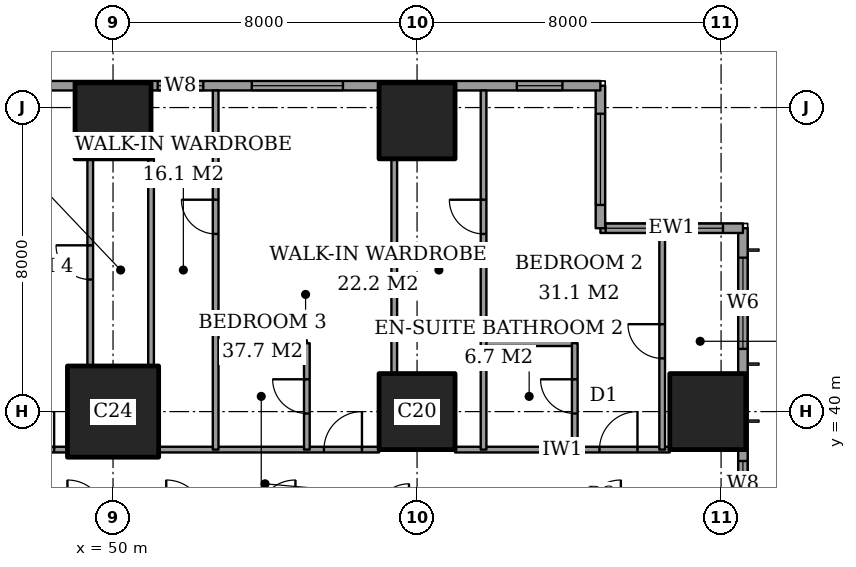
"""IFC4 building model, lengths in metres.
Left out: names, types, materials, properties, quantities, classifications, styles, units other than length and angle.
Written with IfcOpenShell. Run it as: python <this file> out.ifc"""

import sys

from ifc_helpers import new_model, si_unit, direction, frame, frame_2d, origin, origin_2d, place, context, subcontext, project, spatial, rectangle, extrude, element, fill, save


model = new_model("IFC4")
c1 = context("Model", 3, precision=1e-05, world=origin(), true_north=direction((0.0, 1.0)))
c2 = subcontext(c1, "Body", "Model", "MODEL_VIEW")
j1 = project(units=[si_unit("LENGTHUNIT", "METRE"), si_unit("PLANEANGLEUNIT", "RADIAN")], contexts=[c1])
p1 = place(None, origin())
s1 = spatial("IfcSite", under=j1, at=p1, CompositionType="ELEMENT")
p2 = place(p1, origin())
s2 = spatial("IfcBuilding", under=s1, at=p2, CompositionType="ELEMENT")
p3 = place(p2, frame((0.0, 0.0, 65.6)))
s3 = spatial("IfcBuildingStorey", under=s2, at=p3, CompositionType="ELEMENT", Elevation=65.6)
p4 = place(p3, frame((50.0, 40.0, 0.0), z_axis=(0.0, 0.0, 1.0), x_axis=(1.0, 0.0, 0.0)))
e1 = element("IfcColumn", 1, at=p4, inside=s3, PredefinedType="COLUMN", context=c2, shape_type="SweptSolid", body=[
    extrude(rectangle(XDim=2.4, YDim=2.4, at=origin_2d()), origin(), (0.0, 0.0, 1.0), 3.6),
])
for number, where, z_axis, x_axis in (
    (2, (50.0, 47.65, 0.0), (0.0, 0.0, 1.0), (1.0, 0.0, 0.0)),
    (3, (58.0, 40.0, 0.0), (0.0, 0.0, 1.0), (1.0, 0.0, 0.0)),
    (4, (58.0, 47.65, 0.0), (0.0, 0.0, 1.0), (1.0, 0.0, 0.0)),
    (5, (65.65, 40.0, 0.0), (0.0, 0.0, 1.0), (1.0, 0.0, 0.0)),
):
    element("IfcColumn", number, at=place(p3, frame(where, z_axis=z_axis, x_axis=x_axis)), inside=s3, PredefinedType="COLUMN", context=c2, shape_type="SweptSolid", body=[
        extrude(rectangle(XDim=2.0, YDim=2.0, at=origin_2d()), origin(), (0.0, 0.0, 1.0), 3.6),
    ])
p5 = place(p3, frame((66.575, 3.175, 0.0), z_axis=(0.0, 0.0, 1.0), x_axis=(0.0, 1.0, 0.0)))
e6 = element("IfcWall", 6, at=p5, inside=s3, PredefinedType="SOLIDWALL", context=c2, shape_type="SweptSolid", body=[
    extrude(rectangle(XDim=41.65, YDim=0.25, at=frame_2d((20.825, 0.0))), origin(), (0.0, 0.0, 1.0), 3.6),
])
p6 = place(p5, frame((0.775, 0.0, 0.6)))
e7 = element("IfcOpeningElement", 7, at=p6, cuts=e6, PredefinedType="OPENING", context=c2, shape_type="SweptSolid", body=[
    extrude(rectangle(XDim=2.4, YDim=2.0, at=frame_2d((1.2, 1.0))), frame((0.0, 0.135, 0.0), z_axis=(0.0, -1.0, 0.0), x_axis=(1.0, 0.0, 0.0)), (0.0, 0.0, 1.0), 0.27),
])
p7 = place(p5, frame((6.1, 0.0, 0.6)))
e8 = element("IfcOpeningElement", 8, at=p7, cuts=e6, PredefinedType="OPENING", context=c2, shape_type="SweptSolid", body=[
    extrude(rectangle(XDim=1.2, YDim=2.0, at=frame_2d((0.6, 1.0))), frame((0.0, 0.135, 0.0), z_axis=(0.0, -1.0, 0.0), x_axis=(1.0, 0.0, 0.0)), (0.0, 0.0, 1.0), 0.27),
])
p8 = place(p5, frame((8.275, 0.0, 0.6)))
e9 = element("IfcOpeningElement", 9, at=p8, cuts=e6, PredefinedType="OPENING", context=c2, shape_type="SweptSolid", body=[
    extrude(rectangle(XDim=2.4, YDim=2.0, at=frame_2d((1.2, 1.0))), frame((0.0, 0.135, 0.0), z_axis=(0.0, -1.0, 0.0), x_axis=(1.0, 0.0, 0.0)), (0.0, 0.0, 1.0), 0.27),
])
p9 = place(p5, frame((15.775, 0.0, 0.6)))
e10 = element("IfcOpeningElement", 10, at=p9, cuts=e6, PredefinedType="OPENING", context=c2, shape_type="SweptSolid", body=[
    extrude(rectangle(XDim=2.4, YDim=2.0, at=frame_2d((1.2, 1.0))), frame((0.0, 0.135, 0.0), z_axis=(0.0, -1.0, 0.0), x_axis=(1.0, 0.0, 0.0)), (0.0, 0.0, 1.0), 0.27),
])
p10 = place(p5, frame((23.475, 0.0, 0.6)))
e11 = element("IfcOpeningElement", 11, at=p10, cuts=e6, PredefinedType="OPENING", context=c2, shape_type="SweptSolid", body=[
    extrude(rectangle(XDim=2.4, YDim=2.0, at=frame_2d((1.2, 1.0))), frame((0.0, 0.135, 0.0), z_axis=(0.0, -1.0, 0.0), x_axis=(1.0, 0.0, 0.0)), (0.0, 0.0, 1.0), 0.27),
])
p11 = place(p5, frame((30.875, 0.0, 0.6)))
e12 = element("IfcOpeningElement", 12, at=p11, cuts=e6, PredefinedType="OPENING", context=c2, shape_type="SweptSolid", body=[
    extrude(rectangle(XDim=2.4, YDim=2.0, at=frame_2d((1.2, 1.0))), frame((0.0, 0.135, 0.0), z_axis=(0.0, -1.0, 0.0), x_axis=(1.0, 0.0, 0.0)), (0.0, 0.0, 1.0), 0.27),
])
p12 = place(p5, frame((34.325, 0.0, 0.6)))
e13 = element("IfcOpeningElement", 13, at=p12, cuts=e6, PredefinedType="OPENING", context=c2, shape_type="SweptSolid", body=[
    extrude(rectangle(XDim=1.2, YDim=2.0, at=frame_2d((0.6, 1.0))), frame((0.0, 0.135, 0.0), z_axis=(0.0, -1.0, 0.0), x_axis=(1.0, 0.0, 0.0)), (0.0, 0.0, 1.0), 0.27),
])
p13 = place(p5, frame((38.475, 0.0, 0.6)))
e14 = element("IfcOpeningElement", 14, at=p13, cuts=e6, PredefinedType="OPENING", context=c2, shape_type="SweptSolid", body=[
    extrude(rectangle(XDim=2.4, YDim=2.0, at=frame_2d((1.2, 1.0))), frame((0.0, 0.135, 0.0), z_axis=(0.0, -1.0, 0.0), x_axis=(1.0, 0.0, 0.0)), (0.0, 0.0, 1.0), 0.27),
])
p14 = place(p3, frame((66.575, 44.825, 0.0), z_axis=(0.0, 0.0, 1.0), x_axis=(-1.0, 0.0, 0.0)))
e15 = element("IfcWall", 15, at=p14, inside=s3, PredefinedType="SOLIDWALL", context=c2, shape_type="SweptSolid", body=[
    extrude(rectangle(XDim=3.75, YDim=0.25, at=frame_2d((1.875, 0.0))), origin(), (0.0, 0.0, 1.0), 3.6),
])
p15 = place(p14, frame((0.525, 0.0, 0.6)))
e16 = element("IfcOpeningElement", 16, at=p15, cuts=e15, PredefinedType="OPENING", context=c2, shape_type="SweptSolid", body=[
    extrude(rectangle(XDim=1.2, YDim=2.0, at=frame_2d((0.6, 1.0))), frame((0.0, 0.135, 0.0), z_axis=(0.0, -1.0, 0.0), x_axis=(1.0, 0.0, 0.0)), (0.0, 0.0, 1.0), 0.27),
])
p16 = place(p14, frame((2.413, 0.0, 0.6)))
e17 = element("IfcOpeningElement", 17, at=p16, cuts=e15, PredefinedType="OPENING", context=c2, shape_type="SweptSolid", body=[
    extrude(rectangle(XDim=1.2, YDim=2.0, at=frame_2d((0.6, 1.0))), frame((0.0, 0.135, 0.0), z_axis=(0.0, -1.0, 0.0), x_axis=(1.0, 0.0, 0.0)), (0.0, 0.0, 1.0), 0.27),
])
p17 = place(p3, frame((62.825, 44.825, 0.0), z_axis=(0.0, 0.0, 1.0), x_axis=(0.0, 1.0, 0.0)))
e18 = element("IfcWall", 18, at=p17, inside=s3, PredefinedType="SOLIDWALL", context=c2, shape_type="SweptSolid", body=[
    extrude(rectangle(XDim=3.75, YDim=0.25, at=frame_2d((1.875, 0.0))), origin(), (0.0, 0.0, 1.0), 3.6),
])
p18 = place(p17, frame((0.613, 0.0, 0.6)))
e19 = element("IfcOpeningElement", 19, at=p18, cuts=e18, PredefinedType="OPENING", context=c2, shape_type="SweptSolid", body=[
    extrude(rectangle(XDim=2.4, YDim=2.0, at=frame_2d((1.2, 1.0))), frame((0.0, 0.135, 0.0), z_axis=(0.0, -1.0, 0.0), x_axis=(1.0, 0.0, 0.0)), (0.0, 0.0, 1.0), 0.27),
])
p19 = place(p3, frame((62.825, 48.575, 0.0), z_axis=(0.0, 0.0, 1.0), x_axis=(-1.0, 0.0, 0.0)))
e20 = element("IfcWall", 20, at=p19, inside=s3, PredefinedType="SOLIDWALL", context=c2, shape_type="SweptSolid", body=[
    extrude(rectangle(XDim=21.4, YDim=0.25, at=frame_2d((10.7, 0.0))), origin(), (0.0, 0.0, 1.0), 3.6),
])
p20 = place(p19, frame((1.0, 0.0, 0.6)))
e21 = element("IfcOpeningElement", 21, at=p20, cuts=e20, PredefinedType="OPENING", context=c2, shape_type="SweptSolid", body=[
    extrude(rectangle(XDim=1.2, YDim=2.0, at=frame_2d((0.6, 1.0))), frame((0.0, 0.135, 0.0), z_axis=(0.0, -1.0, 0.0), x_axis=(1.0, 0.0, 0.0)), (0.0, 0.0, 1.0), 0.27),
])
p21 = place(p19, frame((6.775, 0.0, 0.6)))
e22 = element("IfcOpeningElement", 22, at=p21, cuts=e20, PredefinedType="OPENING", context=c2, shape_type="SweptSolid", body=[
    extrude(rectangle(XDim=2.4, YDim=2.0, at=frame_2d((1.2, 1.0))), frame((0.0, 0.135, 0.0), z_axis=(0.0, -1.0, 0.0), x_axis=(1.0, 0.0, 0.0)), (0.0, 0.0, 1.0), 0.27),
])
p22 = place(p19, frame((10.45, 0.0, 0.6)))
e23 = element("IfcOpeningElement", 23, at=p22, cuts=e20, PredefinedType="OPENING", context=c2, shape_type="SweptSolid", body=[
    extrude(rectangle(XDim=1.2, YDim=2.0, at=frame_2d((0.6, 1.0))), frame((0.0, 0.135, 0.0), z_axis=(0.0, -1.0, 0.0), x_axis=(1.0, 0.0, 0.0)), (0.0, 0.0, 1.0), 0.27),
])
p23 = place(p19, frame((14.475, 0.0, 0.6)))
e24 = element("IfcOpeningElement", 24, at=p23, cuts=e20, PredefinedType="OPENING", context=c2, shape_type="SweptSolid", body=[
    extrude(rectangle(XDim=2.4, YDim=2.0, at=frame_2d((1.2, 1.0))), frame((0.0, 0.135, 0.0), z_axis=(0.0, -1.0, 0.0), x_axis=(1.0, 0.0, 0.0)), (0.0, 0.0, 1.0), 0.27),
])
p24 = place(p19, frame((17.9, 0.0, 0.6)))
e25 = element("IfcOpeningElement", 25, at=p24, cuts=e20, PredefinedType="OPENING", context=c2, shape_type="SweptSolid", body=[
    extrude(rectangle(XDim=1.2, YDim=2.0, at=frame_2d((0.6, 1.0))), frame((0.0, 0.135, 0.0), z_axis=(0.0, -1.0, 0.0), x_axis=(1.0, 0.0, 0.0)), (0.0, 0.0, 1.0), 0.27),
])
p25 = place(p3, frame((43.35, 39.0, 0.0), z_axis=(0.0, 0.0, 1.0), x_axis=(1.0, 0.0, 0.0)))
e26 = element("IfcWall", 26, at=p25, inside=s3, PredefinedType="PARTITIONING", context=c2, shape_type="SweptSolid", body=[
    extrude(rectangle(XDim=5.45, YDim=0.15, at=frame_2d((2.725, 0.0))), origin(), (0.0, 0.0, 1.0), 3.35),
])
p26 = place(p25, frame((4.1, 0.0, 0.0)))
e27 = element("IfcOpeningElement", 27, at=p26, cuts=e26, PredefinedType="OPENING", context=c2, shape_type="SweptSolid", body=[
    extrude(rectangle(XDim=1.0, YDim=2.1, at=frame_2d((0.5, 1.05))), frame((0.0, 0.085, 0.0), z_axis=(0.0, -1.0, 0.0), x_axis=(1.0, 0.0, 0.0)), (0.0, 0.0, 1.0), 0.17),
])
p27 = place(p25, frame((0.475, 0.0, 0.0)))
e28 = element("IfcOpeningElement", 28, at=p27, cuts=e26, PredefinedType="OPENING", context=c2, shape_type="SweptSolid", body=[
    extrude(rectangle(XDim=1.0, YDim=2.1, at=frame_2d((0.5, 1.05))), frame((0.0, 0.085, 0.0), z_axis=(0.0, -1.0, 0.0), x_axis=(1.0, 0.0, 0.0)), (0.0, 0.0, 1.0), 0.17),
])
p28 = place(p3, frame((51.2, 39.0, 0.0), z_axis=(0.0, 0.0, 1.0), x_axis=(1.0, 0.0, 0.0)))
e29 = element("IfcWall", 29, at=p28, inside=s3, PredefinedType="PARTITIONING", context=c2, shape_type="SweptSolid", body=[
    extrude(rectangle(XDim=5.8, YDim=0.15, at=frame_2d((2.9, 0.0))), origin(), (0.0, 0.0, 1.0), 3.35),
])
p29 = place(p28, frame((4.35, 0.0, 0.0)))
e30 = element("IfcOpeningElement", 30, at=p29, cuts=e29, PredefinedType="OPENING", context=c2, shape_type="SweptSolid", body=[
    extrude(rectangle(XDim=1.0, YDim=2.1, at=frame_2d((0.5, 1.05))), frame((0.0, 0.085, 0.0), z_axis=(0.0, -1.0, 0.0), x_axis=(1.0, 0.0, 0.0)), (0.0, 0.0, 1.0), 0.17),
])
p30 = place(p3, frame((59.0, 39.0, 0.0), z_axis=(0.0, 0.0, 1.0), x_axis=(1.0, 0.0, 0.0)))
e31 = element("IfcWall", 31, at=p30, inside=s3, PredefinedType="PARTITIONING", context=c2, shape_type="SweptSolid", body=[
    extrude(rectangle(XDim=5.65, YDim=0.15, at=frame_2d((2.825, 0.0))), origin(), (0.0, 0.0, 1.0), 3.35),
])
p31 = place(p30, frame((3.8, 0.0, 0.0)))
e32 = element("IfcOpeningElement", 32, at=p31, cuts=e31, PredefinedType="OPENING", context=c2, shape_type="SweptSolid", body=[
    extrude(rectangle(XDim=1.0, YDim=2.1, at=frame_2d((0.5, 1.05))), frame((0.0, 0.085, 0.0), z_axis=(0.0, -1.0, 0.0), x_axis=(1.0, 0.0, 0.0)), (0.0, 0.0, 1.0), 0.17),
])
p32 = place(p3, frame((52.7, 41.8, 0.0), z_axis=(0.0, 0.0, 1.0), x_axis=(1.0, 0.0, 0.0)))
e33 = element("IfcWall", 33, at=p32, inside=s3, PredefinedType="PARTITIONING", context=c2, shape_type="SweptSolid", body=[
    extrude(rectangle(XDim=2.4, YDim=0.15, at=frame_2d((1.2, 0.0))), origin(), (0.0, 0.0, 1.0), 3.35),
])
p33 = place(p3, frame((59.75, 41.8, 0.0), z_axis=(0.0, 0.0, 1.0), x_axis=(1.0, 0.0, 0.0)))
e34 = element("IfcWall", 34, at=p33, inside=s3, PredefinedType="PARTITIONING", context=c2, shape_type="SweptSolid", body=[
    extrude(rectangle(XDim=2.4, YDim=0.15, at=frame_2d((1.2, 0.0))), origin(), (0.0, 0.0, 1.0), 3.35),
])
p34 = place(p3, frame((49.4, 41.2, 0.0), z_axis=(0.0, 0.0, 1.0), x_axis=(0.0, 1.0, 0.0)))
e35 = element("IfcWall", 35, at=p34, inside=s3, PredefinedType="PARTITIONING", context=c2, shape_type="SweptSolid", body=[
    extrude(rectangle(XDim=5.45, YDim=0.15, at=frame_2d((2.725, 0.0))), origin(), (0.0, 0.0, 1.0), 3.35),
])
p35 = place(p34, frame((2.275, 0.0, 0.0)))
e36 = element("IfcOpeningElement", 36, at=p35, cuts=e35, PredefinedType="OPENING", context=c2, shape_type="SweptSolid", body=[
    extrude(rectangle(XDim=0.9, YDim=2.1, at=frame_2d((0.45, 1.05))), frame((0.0, 0.085, 0.0), z_axis=(0.0, -1.0, 0.0), x_axis=(1.0, 0.0, 0.0)), (0.0, 0.0, 1.0), 0.17),
])
p36 = place(p3, frame((51.0, 41.2, 0.0), z_axis=(0.0, 0.0, 1.0), x_axis=(0.0, 1.0, 0.0)))
e37 = element("IfcWall", 37, at=p36, inside=s3, PredefinedType="PARTITIONING", context=c2, shape_type="SweptSolid", body=[
    extrude(rectangle(XDim=5.45, YDim=0.15, at=frame_2d((2.725, 0.0))), origin(), (0.0, 0.0, 1.0), 3.35),
])
p37 = place(p3, frame((52.7, 39.0, 0.0), z_axis=(0.0, 0.0, 1.0), x_axis=(0.0, 1.0, 0.0)))
e38 = element("IfcWall", 38, at=p37, inside=s3, PredefinedType="PARTITIONING", context=c2, shape_type="SweptSolid", body=[
    extrude(rectangle(XDim=9.45, YDim=0.15, at=frame_2d((4.725, 0.0))), origin(), (0.0, 0.0, 1.0), 3.35),
])
p38 = place(p37, frame((5.675, 0.0, 0.0)))
e39 = element("IfcOpeningElement", 39, at=p38, cuts=e38, PredefinedType="OPENING", context=c2, shape_type="SweptSolid", body=[
    extrude(rectangle(XDim=0.9, YDim=2.1, at=frame_2d((0.45, 1.05))), frame((0.0, 0.085, 0.0), z_axis=(0.0, -1.0, 0.0), x_axis=(1.0, 0.0, 0.0)), (0.0, 0.0, 1.0), 0.17),
])
p39 = place(p3, frame((55.1, 39.0, 0.0), z_axis=(0.0, 0.0, 1.0), x_axis=(0.0, 1.0, 0.0)))
e40 = element("IfcWall", 40, at=p39, inside=s3, PredefinedType="PARTITIONING", context=c2, shape_type="SweptSolid", body=[
    extrude(rectangle(XDim=2.8, YDim=0.15, at=frame_2d((1.4, 0.0))), origin(), (0.0, 0.0, 1.0), 3.35),
])
p40 = place(p39, frame((0.95, 0.0, 0.0)))
e41 = element("IfcOpeningElement", 41, at=p40, cuts=e40, PredefinedType="OPENING", context=c2, shape_type="SweptSolid", body=[
    extrude(rectangle(XDim=0.9, YDim=2.1, at=frame_2d((0.45, 1.05))), frame((0.0, 0.085, 0.0), z_axis=(0.0, -1.0, 0.0), x_axis=(1.0, 0.0, 0.0)), (0.0, 0.0, 1.0), 0.17),
])
p41 = place(p3, frame((57.4, 41.0, 0.0), z_axis=(0.0, 0.0, 1.0), x_axis=(0.0, 1.0, 0.0)))
e42 = element("IfcWall", 42, at=p41, inside=s3, PredefinedType="PARTITIONING", context=c2, shape_type="SweptSolid", body=[
    extrude(rectangle(XDim=5.65, YDim=0.15, at=frame_2d((2.825, 0.0))), origin(), (0.0, 0.0, 1.0), 3.35),
])
p42 = place(p3, frame((59.75, 39.0, 0.0), z_axis=(0.0, 0.0, 1.0), x_axis=(0.0, 1.0, 0.0)))
e43 = element("IfcWall", 43, at=p42, inside=s3, PredefinedType="PARTITIONING", context=c2, shape_type="SweptSolid", body=[
    extrude(rectangle(XDim=9.45, YDim=0.15, at=frame_2d((4.725, 0.0))), origin(), (0.0, 0.0, 1.0), 3.35),
])
p43 = place(p42, frame((5.675, 0.0, 0.0)))
e44 = element("IfcOpeningElement", 44, at=p43, cuts=e43, PredefinedType="OPENING", context=c2, shape_type="SweptSolid", body=[
    extrude(rectangle(XDim=0.9, YDim=2.1, at=frame_2d((0.45, 1.05))), frame((0.0, 0.085, 0.0), z_axis=(0.0, -1.0, 0.0), x_axis=(1.0, 0.0, 0.0)), (0.0, 0.0, 1.0), 0.17),
])
p44 = place(p3, frame((62.15, 39.0, 0.0), z_axis=(0.0, 0.0, 1.0), x_axis=(0.0, 1.0, 0.0)))
e45 = element("IfcWall", 45, at=p44, inside=s3, PredefinedType="PARTITIONING", context=c2, shape_type="SweptSolid", body=[
    extrude(rectangle(XDim=2.8, YDim=0.15, at=frame_2d((1.4, 0.0))), origin(), (0.0, 0.0, 1.0), 3.35),
])
p45 = place(p44, frame((0.95, 0.0, 0.0)))
e46 = element("IfcOpeningElement", 46, at=p45, cuts=e45, PredefinedType="OPENING", context=c2, shape_type="SweptSolid", body=[
    extrude(rectangle(XDim=0.9, YDim=2.1, at=frame_2d((0.45, 1.05))), frame((0.0, 0.085, 0.0), z_axis=(0.0, -1.0, 0.0), x_axis=(1.0, 0.0, 0.0)), (0.0, 0.0, 1.0), 0.17),
])
p46 = place(p3, frame((64.45, 39.0, 0.0), z_axis=(0.0, 0.0, 1.0), x_axis=(0.0, 1.0, 0.0)))
e47 = element("IfcWall", 47, at=p46, inside=s3, PredefinedType="PARTITIONING", context=c2, shape_type="SweptSolid", body=[
    extrude(rectangle(XDim=5.7, YDim=0.15, at=frame_2d((2.85, 0.0))), origin(), (0.0, 0.0, 1.0), 3.35),
])
p47 = place(p46, frame((2.4, 0.0, 0.0)))
e48 = element("IfcOpeningElement", 48, at=p47, cuts=e47, PredefinedType="OPENING", context=c2, shape_type="SweptSolid", body=[
    extrude(rectangle(XDim=0.9, YDim=2.1, at=frame_2d((0.45, 1.05))), frame((0.0, 0.085, 0.0), z_axis=(0.0, -1.0, 0.0), x_axis=(1.0, 0.0, 0.0)), (0.0, 0.0, 1.0), 0.17),
])
p48 = place(p12, origin())
e49 = element("IfcWindow", 49, at=p48, inside=s3, PartitioningType="SINGLE_PANEL", PredefinedType="WINDOW", context=c2, shape_type="SweptSolid", body=[
    extrude(rectangle(XDim=1.2, YDim=2.0, at=frame_2d((0.6, 1.0))), frame((0.0, 0.03, 0.0), z_axis=(0.0, -1.0, 0.0), x_axis=(1.0, 0.0, 0.0)), (0.0, 0.0, 1.0), 0.06),
])
fill(e13, e49)
p49 = place(p13, origin())
e50 = element("IfcWindow", 50, at=p49, inside=s3, PartitioningType="SINGLE_PANEL", PredefinedType="WINDOW", context=c2, shape_type="SweptSolid", body=[
    extrude(rectangle(XDim=2.4, YDim=2.0, at=frame_2d((1.2, 1.0))), frame((0.0, 0.03, 0.0), z_axis=(0.0, -1.0, 0.0), x_axis=(1.0, 0.0, 0.0)), (0.0, 0.0, 1.0), 0.06),
])
fill(e14, e50)
p50 = place(p15, origin())
e51 = element("IfcWindow", 51, at=p50, inside=s3, PartitioningType="SINGLE_PANEL", PredefinedType="WINDOW", context=c2, shape_type="SweptSolid", body=[
    extrude(rectangle(XDim=1.2, YDim=2.0, at=frame_2d((0.6, 1.0))), frame((0.0, 0.03, 0.0), z_axis=(0.0, -1.0, 0.0), x_axis=(1.0, 0.0, 0.0)), (0.0, 0.0, 1.0), 0.06),
])
fill(e16, e51)
p51 = place(p16, origin())
e52 = element("IfcWindow", 52, at=p51, inside=s3, PartitioningType="SINGLE_PANEL", PredefinedType="WINDOW", context=c2, shape_type="SweptSolid", body=[
    extrude(rectangle(XDim=1.2, YDim=2.0, at=frame_2d((0.6, 1.0))), frame((0.0, 0.03, 0.0), z_axis=(0.0, -1.0, 0.0), x_axis=(1.0, 0.0, 0.0)), (0.0, 0.0, 1.0), 0.06),
])
fill(e17, e52)
p52 = place(p18, origin())
e53 = element("IfcWindow", 53, at=p52, inside=s3, PartitioningType="SINGLE_PANEL", PredefinedType="WINDOW", context=c2, shape_type="SweptSolid", body=[
    extrude(rectangle(XDim=2.4, YDim=2.0, at=frame_2d((1.2, 1.0))), frame((0.0, 0.03, 0.0), z_axis=(0.0, -1.0, 0.0), x_axis=(1.0, 0.0, 0.0)), (0.0, 0.0, 1.0), 0.06),
])
fill(e19, e53)
p53 = place(p20, origin())
e54 = element("IfcWindow", 54, at=p53, inside=s3, PartitioningType="SINGLE_PANEL", PredefinedType="WINDOW", context=c2, shape_type="SweptSolid", body=[
    extrude(rectangle(XDim=1.2, YDim=2.0, at=frame_2d((0.6, 1.0))), frame((0.0, 0.03, 0.0), z_axis=(0.0, -1.0, 0.0), x_axis=(1.0, 0.0, 0.0)), (0.0, 0.0, 1.0), 0.06),
])
fill(e21, e54)
p54 = place(p21, origin())
e55 = element("IfcWindow", 55, at=p54, inside=s3, PartitioningType="SINGLE_PANEL", PredefinedType="WINDOW", context=c2, shape_type="SweptSolid", body=[
    extrude(rectangle(XDim=2.4, YDim=2.0, at=frame_2d((1.2, 1.0))), frame((0.0, 0.03, 0.0), z_axis=(0.0, -1.0, 0.0), x_axis=(1.0, 0.0, 0.0)), (0.0, 0.0, 1.0), 0.06),
])
fill(e22, e55)
p55 = place(p22, origin())
e56 = element("IfcWindow", 56, at=p55, inside=s3, PartitioningType="SINGLE_PANEL", PredefinedType="WINDOW", context=c2, shape_type="SweptSolid", body=[
    extrude(rectangle(XDim=1.2, YDim=2.0, at=frame_2d((0.6, 1.0))), frame((0.0, 0.03, 0.0), z_axis=(0.0, -1.0, 0.0), x_axis=(1.0, 0.0, 0.0)), (0.0, 0.0, 1.0), 0.06),
])
fill(e23, e56)
p56 = place(p47, origin())
e57 = element("IfcDoor", 57, at=p56, inside=s3, OperationType="SINGLE_SWING_LEFT", PredefinedType="DOOR", context=c2, shape_type="SweptSolid", body=[
    extrude(rectangle(XDim=0.9, YDim=2.1, at=frame_2d((0.45, 1.05))), frame((0.0, 0.025, 0.0), z_axis=(0.0, -1.0, 0.0), x_axis=(1.0, 0.0, 0.0)), (0.0, 0.0, 1.0), 0.05),
])
fill(e48, e57)
p57 = place(p45, origin())
e58 = element("IfcDoor", 58, at=p57, inside=s3, OperationType="SINGLE_SWING_LEFT", PredefinedType="DOOR", context=c2, shape_type="SweptSolid", body=[
    extrude(rectangle(XDim=0.9, YDim=2.1, at=frame_2d((0.45, 1.05))), frame((0.0, 0.025, 0.0), z_axis=(0.0, -1.0, 0.0), x_axis=(1.0, 0.0, 0.0)), (0.0, 0.0, 1.0), 0.05),
])
fill(e46, e58)
p58 = place(p31, origin())
e59 = element("IfcDoor", 59, at=p58, inside=s3, OperationType="SINGLE_SWING_LEFT", PredefinedType="DOOR", context=c2, shape_type="SweptSolid", body=[
    extrude(rectangle(XDim=1.0, YDim=2.1, at=frame_2d((0.5, 1.05))), frame((0.0, 0.025, 0.0), z_axis=(0.0, -1.0, 0.0), x_axis=(1.0, 0.0, 0.0)), (0.0, 0.0, 1.0), 0.05),
])
fill(e32, e59)
p59 = place(p43, origin())
e60 = element("IfcDoor", 60, at=p59, inside=s3, OperationType="SINGLE_SWING_LEFT", PredefinedType="DOOR", context=c2, shape_type="SweptSolid", body=[
    extrude(rectangle(XDim=0.9, YDim=2.1, at=frame_2d((0.45, 1.05))), frame((0.0, 0.025, 0.0), z_axis=(0.0, -1.0, 0.0), x_axis=(1.0, 0.0, 0.0)), (0.0, 0.0, 1.0), 0.05),
])
fill(e44, e60)
p60 = place(p40, origin())
e61 = element("IfcDoor", 61, at=p60, inside=s3, OperationType="SINGLE_SWING_LEFT", PredefinedType="DOOR", context=c2, shape_type="SweptSolid", body=[
    extrude(rectangle(XDim=0.9, YDim=2.1, at=frame_2d((0.45, 1.05))), frame((0.0, 0.025, 0.0), z_axis=(0.0, -1.0, 0.0), x_axis=(1.0, 0.0, 0.0)), (0.0, 0.0, 1.0), 0.05),
])
fill(e41, e61)
p61 = place(p29, origin())
e62 = element("IfcDoor", 62, at=p61, inside=s3, OperationType="SINGLE_SWING_LEFT", PredefinedType="DOOR", context=c2, shape_type="SweptSolid", body=[
    extrude(rectangle(XDim=1.0, YDim=2.1, at=frame_2d((0.5, 1.05))), frame((0.0, 0.025, 0.0), z_axis=(0.0, -1.0, 0.0), x_axis=(1.0, 0.0, 0.0)), (0.0, 0.0, 1.0), 0.05),
])
fill(e30, e62)
p62 = place(p38, origin())
e63 = element("IfcDoor", 63, at=p62, inside=s3, OperationType="SINGLE_SWING_LEFT", PredefinedType="DOOR", context=c2, shape_type="SweptSolid", body=[
    extrude(rectangle(XDim=0.9, YDim=2.1, at=frame_2d((0.45, 1.05))), frame((0.0, 0.025, 0.0), z_axis=(0.0, -1.0, 0.0), x_axis=(1.0, 0.0, 0.0)), (0.0, 0.0, 1.0), 0.05),
])
fill(e39, e63)
p63 = place(p35, origin())
e64 = element("IfcDoor", 64, at=p63, inside=s3, OperationType="SINGLE_SWING_LEFT", PredefinedType="DOOR", context=c2, shape_type="SweptSolid", body=[
    extrude(rectangle(XDim=0.9, YDim=2.1, at=frame_2d((0.45, 1.05))), frame((0.0, 0.025, 0.0), z_axis=(0.0, -1.0, 0.0), x_axis=(1.0, 0.0, 0.0)), (0.0, 0.0, 1.0), 0.05),
])
fill(e36, e64)
p64 = place(p26, origin())
e65 = element("IfcDoor", 65, at=p64, inside=s3, OperationType="SINGLE_SWING_LEFT", PredefinedType="DOOR", context=c2, shape_type="SweptSolid", body=[
    extrude(rectangle(XDim=1.0, YDim=2.1, at=frame_2d((0.5, 1.05))), frame((0.0, 0.025, 0.0), z_axis=(0.0, -1.0, 0.0), x_axis=(1.0, 0.0, 0.0)), (0.0, 0.0, 1.0), 0.05),
])
fill(e27, e65)
save(model, sys.argv[1])
